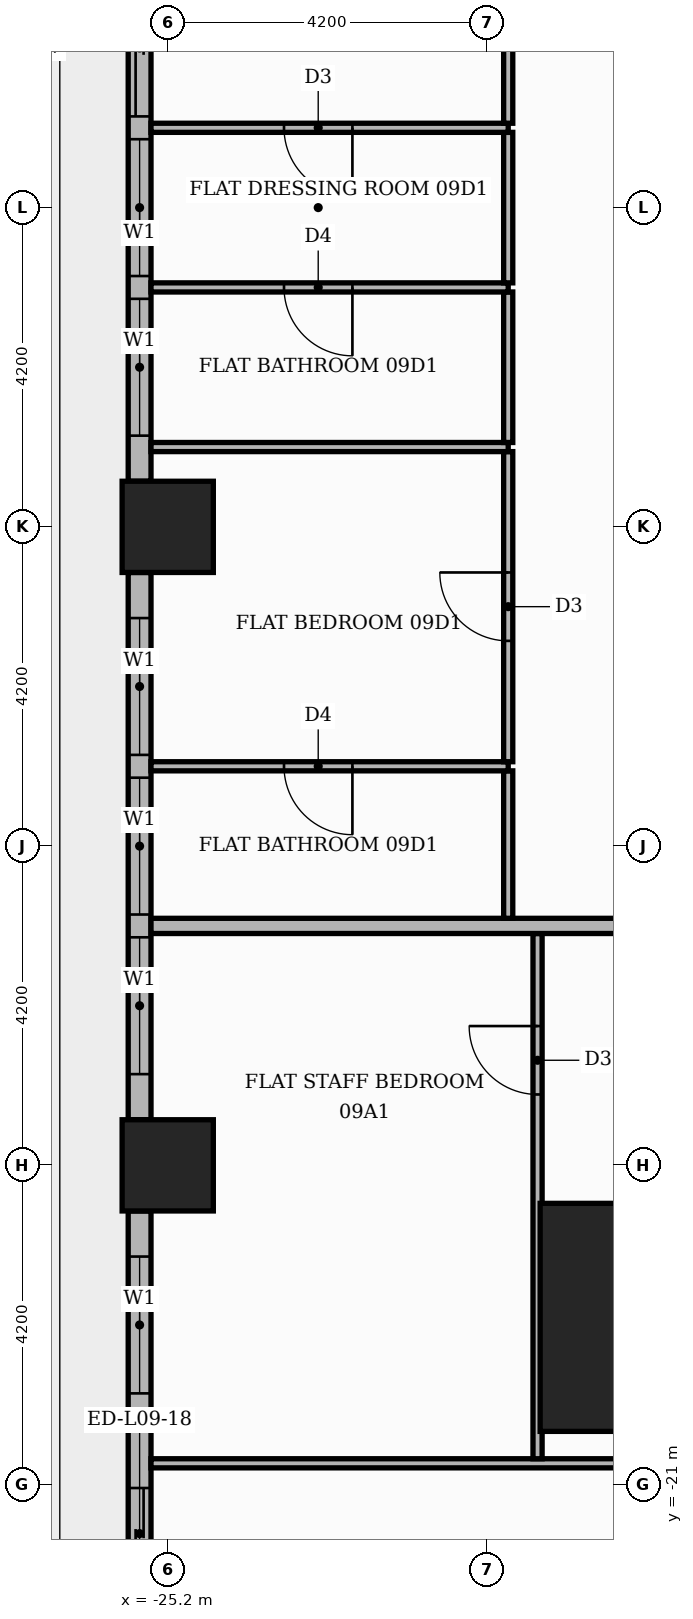
"""IFC4 building model, lengths in metres.
Left out: names, types, materials, properties, quantities, classifications, styles, units other than length and angle.
Written with IfcOpenShell. Run it as: python <this file> out.ifc"""

import sys

from ifc_helpers import new_model, si_unit, direction, frame, frame_2d, origin, origin_2d, place, context, subcontext, project, spatial, rectangle, extrude, element, fill, save


model = new_model("IFC4")
c1 = context("Model", 3, precision=1e-05, world=origin(), true_north=direction((0.0, 1.0)))
c2 = subcontext(c1, "Body", "Model", "MODEL_VIEW")
j1 = project(units=[si_unit("LENGTHUNIT", "METRE"), si_unit("PLANEANGLEUNIT", "RADIAN")], contexts=[c1])
p1 = place(None, origin())
s1 = spatial("IfcSite", under=j1, at=p1, CompositionType="ELEMENT")
p2 = place(p1, origin())
s2 = spatial("IfcBuilding", under=s1, at=p2, CompositionType="ELEMENT")
p3 = place(p2, frame((0.0, 0.0, 42.6)))
s3 = spatial("IfcBuildingStorey", under=s2, at=p3, CompositionType="ELEMENT", Elevation=42.6)
p4 = place(p3, frame((-18.8, -18.8, 0.0), z_axis=(0.0, 0.0, 1.0), x_axis=(1.0, 0.0, 0.0)))
e1 = element("IfcColumn", 1, at=p4, inside=s3, PredefinedType="COLUMN", context=c2, shape_type="SweptSolid", body=[
    extrude(rectangle(XDim=3.0, YDim=3.0, at=origin_2d()), origin(), (0.0, 0.0, 1.0), 3.9),
])
for number, where, z_axis, x_axis in (
    (2, (-25.2, -8.4, 0.0), (0.0, 0.0, 1.0), (1.0, 0.0, 0.0)),
    (3, (-25.2, -16.8, 0.0), (0.0, 0.0, 1.0), (1.0, 0.0, 0.0)),
):
    element("IfcColumn", number, at=place(p3, frame(where, z_axis=z_axis, x_axis=x_axis)), inside=s3, PredefinedType="COLUMN", context=c2, shape_type="SweptSolid", body=[
        extrude(rectangle(XDim=1.2, YDim=1.2, at=origin_2d()), origin(), (0.0, 0.0, 1.0), 3.9),
    ])
p5 = place(p3, frame((-25.57, -0.6, 0.0), z_axis=(0.0, 0.0, 1.0), x_axis=(0.0, -1.0, 0.0)))
e4 = element("IfcWall", 4, at=p5, inside=s3, PredefinedType="STANDARD", context=c2, shape_type="SweptSolid", body=[
    extrude(rectangle(XDim=7.2, YDim=0.3, at=frame_2d((3.6, 0.0))), origin(), (0.0, 0.0, 1.0), 3.48),
])
p6 = place(p5, frame((0.6, 0.0, 0.0)))
e5 = element("IfcOpeningElement", 5, at=p6, cuts=e4, PredefinedType="OPENING", context=c2, shape_type="SweptSolid", body=[
    extrude(rectangle(XDim=1.8, YDim=2.4, at=frame_2d((0.9, 1.2))), frame((0.0, 0.16, 0.0), z_axis=(0.0, -1.0, 0.0), x_axis=(1.0, 0.0, 0.0)), (0.0, 0.0, 1.0), 0.32),
])
p7 = place(p5, frame((2.7, 0.0, 0.9)))
e6 = element("IfcOpeningElement", 6, at=p7, cuts=e4, PredefinedType="OPENING", context=c2, shape_type="SweptSolid", body=[
    extrude(rectangle(XDim=1.8, YDim=2.1, at=frame_2d((0.9, 1.05))), frame((0.0, 0.16, 0.0), z_axis=(0.0, -1.0, 0.0), x_axis=(1.0, 0.0, 0.0)), (0.0, 0.0, 1.0), 0.32),
])
p8 = place(p5, frame((4.8, 0.0, 0.9)))
e7 = element("IfcOpeningElement", 7, at=p8, cuts=e4, PredefinedType="OPENING", context=c2, shape_type="SweptSolid", body=[
    extrude(rectangle(XDim=1.8, YDim=2.1, at=frame_2d((0.9, 1.05))), frame((0.0, 0.16, 0.0), z_axis=(0.0, -1.0, 0.0), x_axis=(1.0, 0.0, 0.0)), (0.0, 0.0, 1.0), 0.32),
])
p9 = place(p3, frame((-25.57, -9.0, 0.0), z_axis=(0.0, 0.0, 1.0), x_axis=(0.0, -1.0, 0.0)))
e8 = element("IfcWall", 8, at=p9, inside=s3, PredefinedType="STANDARD", context=c2, shape_type="SweptSolid", body=[
    extrude(rectangle(XDim=7.2, YDim=0.3, at=frame_2d((3.6, 0.0))), origin(), (0.0, 0.0, 1.0), 3.48),
])
p10 = place(p9, frame((0.6, 0.0, 0.9)))
e9 = element("IfcOpeningElement", 9, at=p10, cuts=e8, PredefinedType="OPENING", context=c2, shape_type="SweptSolid", body=[
    extrude(rectangle(XDim=1.8, YDim=2.1, at=frame_2d((0.9, 1.05))), frame((0.0, 0.16, 0.0), z_axis=(0.0, -1.0, 0.0), x_axis=(1.0, 0.0, 0.0)), (0.0, 0.0, 1.0), 0.32),
])
p11 = place(p9, frame((2.7, 0.0, 0.9)))
e10 = element("IfcOpeningElement", 10, at=p11, cuts=e8, PredefinedType="OPENING", context=c2, shape_type="SweptSolid", body=[
    extrude(rectangle(XDim=1.8, YDim=2.1, at=frame_2d((0.9, 1.05))), frame((0.0, 0.16, 0.0), z_axis=(0.0, -1.0, 0.0), x_axis=(1.0, 0.0, 0.0)), (0.0, 0.0, 1.0), 0.32),
])
p12 = place(p9, frame((4.8, 0.0, 0.9)))
e11 = element("IfcOpeningElement", 11, at=p12, cuts=e8, PredefinedType="OPENING", context=c2, shape_type="SweptSolid", body=[
    extrude(rectangle(XDim=1.8, YDim=2.1, at=frame_2d((0.9, 1.05))), frame((0.0, 0.16, 0.0), z_axis=(0.0, -1.0, 0.0), x_axis=(1.0, 0.0, 0.0)), (0.0, 0.0, 1.0), 0.32),
])
p13 = place(p3, frame((-25.57, -17.4, 0.0), z_axis=(0.0, 0.0, 1.0), x_axis=(0.0, -1.0, 0.0)))
e12 = element("IfcWall", 12, at=p13, inside=s3, PredefinedType="STANDARD", context=c2, shape_type="SweptSolid", body=[
    extrude(rectangle(XDim=5.32, YDim=0.3, at=frame_2d((2.66, 0.0))), origin(), (0.0, 0.0, 1.0), 3.48),
])
p14 = place(p13, frame((0.6, 0.0, 0.9)))
e13 = element("IfcOpeningElement", 13, at=p14, cuts=e12, PredefinedType="OPENING", context=c2, shape_type="SweptSolid", body=[
    extrude(rectangle(XDim=1.8, YDim=2.1, at=frame_2d((0.9, 1.05))), frame((0.0, 0.16, 0.0), z_axis=(0.0, -1.0, 0.0), x_axis=(1.0, 0.0, 0.0)), (0.0, 0.0, 1.0), 0.32),
])
p15 = place(p13, frame((3.645, 0.0, 0.0)))
e14 = element("IfcOpeningElement", 14, at=p15, cuts=e12, PredefinedType="OPENING", context=c2, shape_type="SweptSolid", body=[
    extrude(rectangle(XDim=1.2, YDim=2.4, at=frame_2d((0.6, 1.2))), frame((0.0, 0.16, 0.0), z_axis=(0.0, -1.0, 0.0), x_axis=(1.0, 0.0, 0.0)), (0.0, 0.0, 1.0), 0.32),
])
p16 = place(p3, frame((-25.42, -20.72, 0.0), z_axis=(0.0, 0.0, 1.0), x_axis=(1.0, 0.0, 0.0)))
e15 = element("IfcWall", 15, at=p16, inside=s3, PredefinedType="PARTITIONING", context=c2, shape_type="SweptSolid", body=[
    extrude(rectangle(XDim=17.77, YDim=0.12, at=frame_2d((8.885, 0.0))), origin(), (0.0, 0.0, 1.0), 3.48),
])
p17 = place(p16, frame((11.27, 0.0, 0.0)))
e16 = element("IfcOpeningElement", 16, at=p17, cuts=e15, PredefinedType="OPENING", context=c2, shape_type="SweptSolid", body=[
    extrude(rectangle(XDim=1.0, YDim=2.1, at=frame_2d((0.5, 1.05))), frame((0.0, 0.07, 0.0), z_axis=(0.0, -1.0, 0.0), x_axis=(1.0, 0.0, 0.0)), (0.0, 0.0, 1.0), 0.14),
])
p18 = place(p16, frame((15.47, 0.0, 0.0)))
e17 = element("IfcOpeningElement", 17, at=p18, cuts=e15, PredefinedType="OPENING", context=c2, shape_type="SweptSolid", body=[
    extrude(rectangle(XDim=1.0, YDim=2.1, at=frame_2d((0.5, 1.05))), frame((0.0, 0.07, 0.0), z_axis=(0.0, -1.0, 0.0), x_axis=(1.0, 0.0, 0.0)), (0.0, 0.0, 1.0), 0.14),
])
p19 = place(p3, frame((-20.334, -20.66, 0.0), z_axis=(0.0, 0.0, 1.0), x_axis=(0.0, 1.0, 0.0)))
e18 = element("IfcWall", 18, at=p19, inside=s3, PredefinedType="PARTITIONING", context=c2, shape_type="SweptSolid", body=[
    extrude(rectangle(XDim=6.91, YDim=0.12, at=frame_2d((3.455, 0.0))), origin(), (0.0, 0.0, 1.0), 3.48),
])
p20 = place(p19, frame((4.792, 0.0, 0.0)))
e19 = element("IfcOpeningElement", 19, at=p20, cuts=e18, PredefinedType="OPENING", context=c2, shape_type="SweptSolid", body=[
    extrude(rectangle(XDim=0.9, YDim=2.1, at=frame_2d((0.45, 1.05))), frame((0.0, 0.07, 0.0), z_axis=(0.0, -1.0, 0.0), x_axis=(1.0, 0.0, 0.0)), (0.0, 0.0, 1.0), 0.14),
])
p21 = place(p3, frame((-25.42, -13.65, 0.0), z_axis=(0.0, 0.0, 1.0), x_axis=(1.0, 0.0, 0.0)))
e20 = element("IfcWall", 20, at=p21, inside=s3, PredefinedType="PARTITIONING", context=c2, shape_type="SweptSolid", body=[
    extrude(rectangle(XDim=39.07, YDim=0.2, at=frame_2d((19.535, 0.0))), origin(), (0.0, 0.0, 1.0), 3.48),
])
p22 = place(p21, frame((13.32, 0.0, 0.0)))
e21 = element("IfcOpeningElement", 21, at=p22, cuts=e20, PredefinedType="OPENING", context=c2, shape_type="SweptSolid", body=[
    extrude(rectangle(XDim=1.1, YDim=2.4, at=frame_2d((0.55, 1.2))), frame((0.0, 0.11, 0.0), z_axis=(0.0, -1.0, 0.0), x_axis=(1.0, 0.0, 0.0)), (0.0, 0.0, 1.0), 0.22),
])
p23 = place(p21, frame((21.72, 0.0, 0.0)))
e22 = element("IfcOpeningElement", 22, at=p23, cuts=e20, PredefinedType="OPENING", context=c2, shape_type="SweptSolid", body=[
    extrude(rectangle(XDim=1.1, YDim=2.4, at=frame_2d((0.55, 1.2))), frame((0.0, 0.11, 0.0), z_axis=(0.0, -1.0, 0.0), x_axis=(1.0, 0.0, 0.0)), (0.0, 0.0, 1.0), 0.22),
])
p24 = place(p3, frame((-20.72, -13.55, 0.0), z_axis=(0.0, 0.0, 1.0), x_axis=(0.0, 1.0, 0.0)))
e23 = element("IfcWall", 23, at=p24, inside=s3, PredefinedType="PARTITIONING", context=c2, shape_type="SweptSolid", body=[
    extrude(rectangle(XDim=1.94, YDim=0.12, at=frame_2d((0.97, 0.0))), origin(), (0.0, 0.0, 1.0), 3.48),
])
p25 = place(p3, frame((-25.42, -11.55, 0.0), z_axis=(0.0, 0.0, 1.0), x_axis=(1.0, 0.0, 0.0)))
e24 = element("IfcWall", 24, at=p25, inside=s3, PredefinedType="PARTITIONING", context=c2, shape_type="SweptSolid", body=[
    extrude(rectangle(XDim=4.7, YDim=0.12, at=frame_2d((2.35, 0.0))), origin(), (0.0, 0.0, 1.0), 3.48),
])
p26 = place(p25, frame((1.75, 0.0, 0.0)))
e25 = element("IfcOpeningElement", 25, at=p26, cuts=e24, PredefinedType="OPENING", context=c2, shape_type="SweptSolid", body=[
    extrude(rectangle(XDim=0.9, YDim=2.1, at=frame_2d((0.45, 1.05))), frame((0.0, 0.07, 0.0), z_axis=(0.0, -1.0, 0.0), x_axis=(1.0, 0.0, 0.0)), (0.0, 0.0, 1.0), 0.14),
])
p27 = place(p3, frame((-20.72, -11.49, 0.0), z_axis=(0.0, 0.0, 1.0), x_axis=(0.0, 1.0, 0.0)))
e26 = element("IfcWall", 26, at=p27, inside=s3, PredefinedType="PARTITIONING", context=c2, shape_type="SweptSolid", body=[
    extrude(rectangle(XDim=4.08, YDim=0.12, at=frame_2d((2.04, 0.0))), origin(), (0.0, 0.0, 1.0), 3.48),
])
p28 = place(p27, frame((1.59, 0.0, 0.0)))
e27 = element("IfcOpeningElement", 27, at=p28, cuts=e26, PredefinedType="OPENING", context=c2, shape_type="SweptSolid", body=[
    extrude(rectangle(XDim=0.9, YDim=2.1, at=frame_2d((0.45, 1.05))), frame((0.0, 0.07, 0.0), z_axis=(0.0, -1.0, 0.0), x_axis=(1.0, 0.0, 0.0)), (0.0, 0.0, 1.0), 0.14),
])
p29 = place(p3, frame((-25.42, -7.35, 0.0), z_axis=(0.0, 0.0, 1.0), x_axis=(1.0, 0.0, 0.0)))
e28 = element("IfcWall", 28, at=p29, inside=s3, PredefinedType="PARTITIONING", context=c2, shape_type="SweptSolid", body=[
    extrude(rectangle(XDim=4.7, YDim=0.12, at=frame_2d((2.35, 0.0))), origin(), (0.0, 0.0, 1.0), 3.48),
])
p30 = place(p3, frame((-20.72, -7.29, 0.0), z_axis=(0.0, 0.0, 1.0), x_axis=(0.0, 1.0, 0.0)))
e29 = element("IfcWall", 29, at=p30, inside=s3, PredefinedType="PARTITIONING", context=c2, shape_type="SweptSolid", body=[
    extrude(rectangle(XDim=1.98, YDim=0.12, at=frame_2d((0.99, 0.0))), origin(), (0.0, 0.0, 1.0), 3.48),
])
p31 = place(p3, frame((-25.42, -5.25, 0.0), z_axis=(0.0, 0.0, 1.0), x_axis=(1.0, 0.0, 0.0)))
e30 = element("IfcWall", 30, at=p31, inside=s3, PredefinedType="PARTITIONING", context=c2, shape_type="SweptSolid", body=[
    extrude(rectangle(XDim=4.7, YDim=0.12, at=frame_2d((2.35, 0.0))), origin(), (0.0, 0.0, 1.0), 3.48),
])
p32 = place(p31, frame((1.75, 0.0, 0.0)))
e31 = element("IfcOpeningElement", 31, at=p32, cuts=e30, PredefinedType="OPENING", context=c2, shape_type="SweptSolid", body=[
    extrude(rectangle(XDim=0.9, YDim=2.1, at=frame_2d((0.45, 1.05))), frame((0.0, 0.07, 0.0), z_axis=(0.0, -1.0, 0.0), x_axis=(1.0, 0.0, 0.0)), (0.0, 0.0, 1.0), 0.14),
])
p33 = place(p3, frame((-20.72, -5.19, 0.0), z_axis=(0.0, 0.0, 1.0), x_axis=(0.0, 1.0, 0.0)))
e32 = element("IfcWall", 32, at=p33, inside=s3, PredefinedType="PARTITIONING", context=c2, shape_type="SweptSolid", body=[
    extrude(rectangle(XDim=1.98, YDim=0.12, at=frame_2d((0.99, 0.0))), origin(), (0.0, 0.0, 1.0), 3.48),
])
p34 = place(p3, frame((-25.42, -3.15, 0.0), z_axis=(0.0, 0.0, 1.0), x_axis=(1.0, 0.0, 0.0)))
e33 = element("IfcWall", 33, at=p34, inside=s3, PredefinedType="PARTITIONING", context=c2, shape_type="SweptSolid", body=[
    extrude(rectangle(XDim=4.7, YDim=0.12, at=frame_2d((2.35, 0.0))), origin(), (0.0, 0.0, 1.0), 3.48),
])
p35 = place(p34, frame((1.75, 0.0, 0.0)))
e34 = element("IfcOpeningElement", 34, at=p35, cuts=e33, PredefinedType="OPENING", context=c2, shape_type="SweptSolid", body=[
    extrude(rectangle(XDim=0.9, YDim=2.1, at=frame_2d((0.45, 1.05))), frame((0.0, 0.07, 0.0), z_axis=(0.0, -1.0, 0.0), x_axis=(1.0, 0.0, 0.0)), (0.0, 0.0, 1.0), 0.14),
])
p36 = place(p3, frame((-20.72, -3.09, 0.0), z_axis=(0.0, 0.0, 1.0), x_axis=(0.0, 1.0, 0.0)))
e35 = element("IfcWall", 35, at=p36, inside=s3, PredefinedType="PARTITIONING", context=c2, shape_type="SweptSolid", body=[
    extrude(rectangle(XDim=8.28, YDim=0.12, at=frame_2d((4.14, 0.0))), origin(), (0.0, 0.0, 1.0), 3.48),
])
p37 = place(p36, frame((3.69, 0.0, 0.0)))
e36 = element("IfcOpeningElement", 36, at=p37, cuts=e35, PredefinedType="OPENING", context=c2, shape_type="SweptSolid", body=[
    extrude(rectangle(XDim=0.9, YDim=2.1, at=frame_2d((0.45, 1.05))), frame((0.0, 0.07, 0.0), z_axis=(0.0, -1.0, 0.0), x_axis=(1.0, 0.0, 0.0)), (0.0, 0.0, 1.0), 0.14),
])
p38 = place(p6, origin())
e37 = element("IfcDoor", 37, at=p38, inside=s3, OperationType="SLIDING_TO_LEFT", PredefinedType="DOOR", context=c2, shape_type="SweptSolid", body=[
    extrude(rectangle(XDim=1.8, YDim=2.4, at=frame_2d((0.9, 1.2))), frame((0.0, 0.025, 0.0), z_axis=(0.0, -1.0, 0.0), x_axis=(1.0, 0.0, 0.0)), (0.0, 0.0, 1.0), 0.05),
])
fill(e5, e37)
p39 = place(p7, origin())
e38 = element("IfcWindow", 38, at=p39, inside=s3, PartitioningType="SINGLE_PANEL", PredefinedType="WINDOW", context=c2, shape_type="SweptSolid", body=[
    extrude(rectangle(XDim=1.8, YDim=2.1, at=frame_2d((0.9, 1.05))), frame((0.0, 0.03, 0.0), z_axis=(0.0, -1.0, 0.0), x_axis=(1.0, 0.0, 0.0)), (0.0, 0.0, 1.0), 0.06),
])
fill(e6, e38)
p40 = place(p8, origin())
e39 = element("IfcWindow", 39, at=p40, inside=s3, PartitioningType="SINGLE_PANEL", PredefinedType="WINDOW", context=c2, shape_type="SweptSolid", body=[
    extrude(rectangle(XDim=1.8, YDim=2.1, at=frame_2d((0.9, 1.05))), frame((0.0, 0.03, 0.0), z_axis=(0.0, -1.0, 0.0), x_axis=(1.0, 0.0, 0.0)), (0.0, 0.0, 1.0), 0.06),
])
fill(e7, e39)
p41 = place(p10, origin())
e40 = element("IfcWindow", 40, at=p41, inside=s3, PartitioningType="SINGLE_PANEL", PredefinedType="WINDOW", context=c2, shape_type="SweptSolid", body=[
    extrude(rectangle(XDim=1.8, YDim=2.1, at=frame_2d((0.9, 1.05))), frame((0.0, 0.03, 0.0), z_axis=(0.0, -1.0, 0.0), x_axis=(1.0, 0.0, 0.0)), (0.0, 0.0, 1.0), 0.06),
])
fill(e9, e40)
p42 = place(p11, origin())
e41 = element("IfcWindow", 41, at=p42, inside=s3, PartitioningType="SINGLE_PANEL", PredefinedType="WINDOW", context=c2, shape_type="SweptSolid", body=[
    extrude(rectangle(XDim=1.8, YDim=2.1, at=frame_2d((0.9, 1.05))), frame((0.0, 0.03, 0.0), z_axis=(0.0, -1.0, 0.0), x_axis=(1.0, 0.0, 0.0)), (0.0, 0.0, 1.0), 0.06),
])
fill(e10, e41)
p43 = place(p12, origin())
e42 = element("IfcWindow", 42, at=p43, inside=s3, PartitioningType="SINGLE_PANEL", PredefinedType="WINDOW", context=c2, shape_type="SweptSolid", body=[
    extrude(rectangle(XDim=1.8, YDim=2.1, at=frame_2d((0.9, 1.05))), frame((0.0, 0.03, 0.0), z_axis=(0.0, -1.0, 0.0), x_axis=(1.0, 0.0, 0.0)), (0.0, 0.0, 1.0), 0.06),
])
fill(e11, e42)
p44 = place(p14, origin())
e43 = element("IfcWindow", 43, at=p44, inside=s3, PartitioningType="SINGLE_PANEL", PredefinedType="WINDOW", context=c2, shape_type="SweptSolid", body=[
    extrude(rectangle(XDim=1.8, YDim=2.1, at=frame_2d((0.9, 1.05))), frame((0.0, 0.03, 0.0), z_axis=(0.0, -1.0, 0.0), x_axis=(1.0, 0.0, 0.0)), (0.0, 0.0, 1.0), 0.06),
])
fill(e13, e43)
p45 = place(p15, origin())
e44 = element("IfcDoor", 44, at=p45, inside=s3, OperationType="SLIDING_TO_RIGHT", PredefinedType="DOOR", context=c2, shape_type="SweptSolid", body=[
    extrude(rectangle(XDim=1.2, YDim=2.4, at=frame_2d((0.6, 1.2))), frame((0.0, 0.025, 0.0), z_axis=(0.0, -1.0, 0.0), x_axis=(1.0, 0.0, 0.0)), (0.0, 0.0, 1.0), 0.05),
])
fill(e14, e44)
p46 = place(p20, origin())
e45 = element("IfcDoor", 45, at=p46, inside=s3, OperationType="SINGLE_SWING_RIGHT", PredefinedType="DOOR", context=c2, shape_type="SweptSolid", body=[
    extrude(rectangle(XDim=0.9, YDim=2.1, at=frame_2d((0.45, 1.05))), frame((0.0, 0.025, 0.0), z_axis=(0.0, -1.0, 0.0), x_axis=(1.0, 0.0, 0.0)), (0.0, 0.0, 1.0), 0.05),
])
fill(e19, e45)
p47 = place(p35, frame((0.9, 0.0, 0.0), z_axis=(0.0, 0.0, 1.0), x_axis=(-1.0, 0.0, 0.0)))
e46 = element("IfcDoor", 46, at=p47, inside=s3, OperationType="SINGLE_SWING_RIGHT", PredefinedType="DOOR", context=c2, shape_type="SweptSolid", body=[
    extrude(rectangle(XDim=0.9, YDim=2.1, at=frame_2d((0.45, 1.05))), frame((0.0, 0.025, 0.0), z_axis=(0.0, -1.0, 0.0), x_axis=(1.0, 0.0, 0.0)), (0.0, 0.0, 1.0), 0.05),
])
fill(e34, e46)
p48 = place(p32, frame((0.9, 0.0, 0.0), z_axis=(0.0, 0.0, 1.0), x_axis=(-1.0, 0.0, 0.0)))
e47 = element("IfcDoor", 47, at=p48, inside=s3, OperationType="SINGLE_SWING_RIGHT", PredefinedType="DOOR", context=c2, shape_type="SweptSolid", body=[
    extrude(rectangle(XDim=0.9, YDim=2.1, at=frame_2d((0.45, 1.05))), frame((0.0, 0.025, 0.0), z_axis=(0.0, -1.0, 0.0), x_axis=(1.0, 0.0, 0.0)), (0.0, 0.0, 1.0), 0.05),
])
fill(e31, e47)
p49 = place(p28, origin())
e48 = element("IfcDoor", 48, at=p49, inside=s3, OperationType="SINGLE_SWING_RIGHT", PredefinedType="DOOR", context=c2, shape_type="SweptSolid", body=[
    extrude(rectangle(XDim=0.9, YDim=2.1, at=frame_2d((0.45, 1.05))), frame((0.0, 0.025, 0.0), z_axis=(0.0, -1.0, 0.0), x_axis=(1.0, 0.0, 0.0)), (0.0, 0.0, 1.0), 0.05),
])
fill(e27, e48)
p50 = place(p26, frame((0.9, 0.0, 0.0), z_axis=(0.0, 0.0, 1.0), x_axis=(-1.0, 0.0, 0.0)))
e49 = element("IfcDoor", 49, at=p50, inside=s3, OperationType="SINGLE_SWING_RIGHT", PredefinedType="DOOR", context=c2, shape_type="SweptSolid", body=[
    extrude(rectangle(XDim=0.9, YDim=2.1, at=frame_2d((0.45, 1.05))), frame((0.0, 0.025, 0.0), z_axis=(0.0, -1.0, 0.0), x_axis=(1.0, 0.0, 0.0)), (0.0, 0.0, 1.0), 0.05),
])
fill(e25, e49)
save(model, sys.argv[1])
